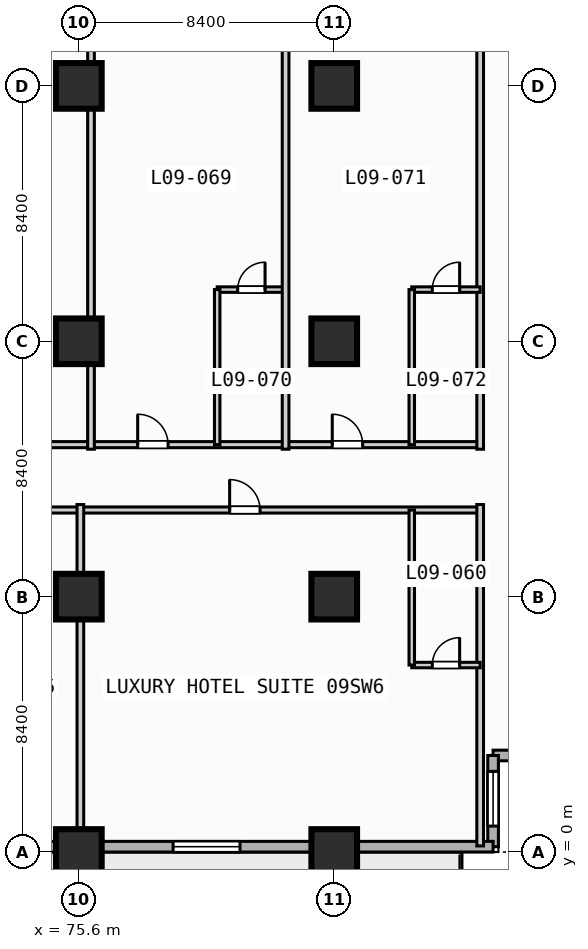
"""IFC4 building model, lengths in metres.
Left out: names, types, materials, properties, quantities, classifications, styles, units other than length and angle.
Written with IfcOpenShell. Run it as: python <this file> out.ifc"""

import sys

from ifc_helpers import new_model, si_unit, direction, frame, frame_2d, origin, origin_2d, place, context, subcontext, project, spatial, rectangle, extrude, element, fill, save


model = new_model("IFC4")
c1 = context("Model", 3, precision=1e-05, world=origin(), true_north=direction((0.0, 1.0)))
c2 = subcontext(c1, "Body", "Model", "MODEL_VIEW")
j1 = project(units=[si_unit("LENGTHUNIT", "METRE"), si_unit("PLANEANGLEUNIT", "RADIAN")], contexts=[c1])
p1 = place(None, origin())
s1 = spatial("IfcSite", under=j1, at=p1, CompositionType="ELEMENT")
p2 = place(p1, origin())
s2 = spatial("IfcBuilding", under=s1, at=p2, CompositionType="ELEMENT")
p3 = place(p2, frame((0.0, 0.0, 43.4)))
s3 = spatial("IfcBuildingStorey", under=s2, at=p3, CompositionType="ELEMENT", Elevation=43.4)
for number, where, z_axis, x_axis in (
    (1, (75.6, 0.0, 0.0), (0.0, 0.0, 1.0), (1.0, 0.0, 0.0)),
    (2, (75.6, 8.4, 0.0), (0.0, 0.0, 1.0), (1.0, 0.0, 0.0)),
    (3, (75.6, 16.8, 0.0), (0.0, 0.0, 1.0), (1.0, 0.0, 0.0)),
    (4, (75.6, 25.2, 0.0), (0.0, 0.0, 1.0), (1.0, 0.0, 0.0)),
    (5, (84.0, 0.0, 0.0), (0.0, 0.0, 1.0), (1.0, 0.0, 0.0)),
    (6, (84.0, 8.4, 0.0), (0.0, 0.0, 1.0), (1.0, 0.0, 0.0)),
    (7, (84.0, 16.8, 0.0), (0.0, 0.0, 1.0), (1.0, 0.0, 0.0)),
    (8, (84.0, 25.2, 0.0), (0.0, 0.0, 1.0), (1.0, 0.0, 0.0)),
):
    element("IfcColumn", number, at=place(p3, frame(where, z_axis=z_axis, x_axis=x_axis)), inside=s3, PredefinedType="COLUMN", context=c2, shape_type="SweptSolid", body=[
        extrude(rectangle(XDim=1.5, YDim=1.5, at=origin_2d()), origin(), (0.0, 0.0, 1.0), 3.8),
    ])
p4 = place(p3, frame((92.225, 3.175, 0.0), z_axis=(0.0, 0.0, 1.0), x_axis=(-1.0, 0.0, 0.0)))
e9 = element("IfcWall", 9, at=p4, inside=s3, PredefinedType="STANDARD", context=c2, shape_type="SweptSolid", body=[
    extrude(rectangle(XDim=3.0, YDim=0.35, at=frame_2d((1.5, 0.0))), origin(), (0.0, 0.0, 1.0), 3.55),
])
p5 = place(p3, frame((89.225, 3.175, 0.0), z_axis=(0.0, 0.0, 1.0), x_axis=(0.0, -1.0, 0.0)))
e10 = element("IfcWall", 10, at=p5, inside=s3, PredefinedType="STANDARD", context=c2, shape_type="SweptSolid", body=[
    extrude(rectangle(XDim=3.0, YDim=0.35, at=frame_2d((1.5, 0.0))), origin(), (0.0, 0.0, 1.0), 3.55),
])
p6 = place(p5, frame((0.522, 0.0, 0.85)))
e11 = element("IfcOpeningElement", 11, at=p6, cuts=e10, PredefinedType="OPENING", context=c2, shape_type="SweptSolid", body=[
    extrude(rectangle(XDim=1.8, YDim=1.8, at=frame_2d((0.9, 0.9))), frame((0.0, 0.185, 0.0), z_axis=(0.0, -1.0, 0.0), x_axis=(1.0, 0.0, 0.0)), (0.0, 0.0, 1.0), 0.37),
])
p7 = place(p3, frame((89.225, 0.175, 0.0), z_axis=(0.0, 0.0, 1.0), x_axis=(-1.0, 0.0, 0.0)))
e12 = element("IfcWall", 12, at=p7, inside=s3, PredefinedType="STANDARD", context=c2, shape_type="SweptSolid", body=[
    extrude(rectangle(XDim=86.05, YDim=0.35, at=frame_2d((43.025, 0.0))), origin(), (0.0, 0.0, 1.0), 3.55),
])
p8 = place(p7, frame((67.525, 0.0, 0.0)))
e13 = element("IfcOpeningElement", 13, at=p8, cuts=e12, PredefinedType="OPENING", context=c2, shape_type="SweptSolid", body=[
    extrude(rectangle(XDim=1.4, YDim=2.2, at=frame_2d((0.7, 1.1))), frame((0.0, 0.185, 0.0), z_axis=(0.0, -1.0, 0.0), x_axis=(1.0, 0.0, 0.0)), (0.0, 0.0, 1.0), 0.37),
])
p9 = place(p7, frame((58.725, 0.0, 0.85)))
e14 = element("IfcOpeningElement", 14, at=p9, cuts=e12, PredefinedType="OPENING", context=c2, shape_type="SweptSolid", body=[
    extrude(rectangle(XDim=2.2, YDim=1.8, at=frame_2d((1.1, 0.9))), frame((0.0, 0.185, 0.0), z_axis=(0.0, -1.0, 0.0), x_axis=(1.0, 0.0, 0.0)), (0.0, 0.0, 1.0), 0.37),
])
p10 = place(p7, frame((41.925, 0.0, 0.85)))
e15 = element("IfcOpeningElement", 15, at=p10, cuts=e12, PredefinedType="OPENING", context=c2, shape_type="SweptSolid", body=[
    extrude(rectangle(XDim=2.2, YDim=1.8, at=frame_2d((1.1, 0.9))), frame((0.0, 0.185, 0.0), z_axis=(0.0, -1.0, 0.0), x_axis=(1.0, 0.0, 0.0)), (0.0, 0.0, 1.0), 0.37),
])
p11 = place(p7, frame((33.525, 0.0, 0.85)))
e16 = element("IfcOpeningElement", 16, at=p11, cuts=e12, PredefinedType="OPENING", context=c2, shape_type="SweptSolid", body=[
    extrude(rectangle(XDim=2.2, YDim=1.8, at=frame_2d((1.1, 0.9))), frame((0.0, 0.185, 0.0), z_axis=(0.0, -1.0, 0.0), x_axis=(1.0, 0.0, 0.0)), (0.0, 0.0, 1.0), 0.37),
])
p12 = place(p7, frame((16.725, 0.0, 0.85)))
e17 = element("IfcOpeningElement", 17, at=p12, cuts=e12, PredefinedType="OPENING", context=c2, shape_type="SweptSolid", body=[
    extrude(rectangle(XDim=2.2, YDim=1.8, at=frame_2d((1.1, 0.9))), frame((0.0, 0.185, 0.0), z_axis=(0.0, -1.0, 0.0), x_axis=(1.0, 0.0, 0.0)), (0.0, 0.0, 1.0), 0.37),
])
p13 = place(p7, frame((8.325, 0.0, 0.85)))
e18 = element("IfcOpeningElement", 18, at=p13, cuts=e12, PredefinedType="OPENING", context=c2, shape_type="SweptSolid", body=[
    extrude(rectangle(XDim=2.2, YDim=1.8, at=frame_2d((1.1, 0.9))), frame((0.0, 0.185, 0.0), z_axis=(0.0, -1.0, 0.0), x_axis=(1.0, 0.0, 0.0)), (0.0, 0.0, 1.0), 0.37),
])
p14 = place(p3, frame((13.65, 11.25, 0.0), z_axis=(0.0, 0.0, 1.0), x_axis=(1.0, 0.0, 0.0)))
e19 = element("IfcWall", 19, at=p14, inside=s3, PredefinedType="PARTITIONING", context=c2, shape_type="SweptSolid", body=[
    extrude(rectangle(XDim=75.15, YDim=0.2, at=frame_2d((37.575, 0.0))), origin(), (0.0, 0.0, 1.0), 3.55),
])
p15 = place(p14, frame((7.265, 0.0, 0.0)))
e20 = element("IfcOpeningElement", 20, at=p15, cuts=e19, PredefinedType="OPENING", context=c2, shape_type="SweptSolid", body=[
    extrude(rectangle(XDim=1.0, YDim=2.15, at=frame_2d((0.5, 1.075))), frame((0.0, 0.11, 0.0), z_axis=(0.0, -1.0, 0.0), x_axis=(1.0, 0.0, 0.0)), (0.0, 0.0, 1.0), 0.22),
])
p16 = place(p14, frame((17.135, 0.0, 0.0)))
e21 = element("IfcOpeningElement", 21, at=p16, cuts=e19, PredefinedType="OPENING", context=c2, shape_type="SweptSolid", body=[
    extrude(rectangle(XDim=1.0, YDim=2.15, at=frame_2d((0.5, 1.075))), frame((0.0, 0.11, 0.0), z_axis=(0.0, -1.0, 0.0), x_axis=(1.0, 0.0, 0.0)), (0.0, 0.0, 1.0), 0.22),
])
p17 = place(p14, frame((31.665, 0.0, 0.0)))
e22 = element("IfcOpeningElement", 22, at=p17, cuts=e19, PredefinedType="OPENING", context=c2, shape_type="SweptSolid", body=[
    extrude(rectangle(XDim=1.0, YDim=2.15, at=frame_2d((0.5, 1.075))), frame((0.0, 0.11, 0.0), z_axis=(0.0, -1.0, 0.0), x_axis=(1.0, 0.0, 0.0)), (0.0, 0.0, 1.0), 0.22),
])
p18 = place(p14, frame((41.535, 0.0, 0.0)))
e23 = element("IfcOpeningElement", 23, at=p18, cuts=e19, PredefinedType="OPENING", context=c2, shape_type="SweptSolid", body=[
    extrude(rectangle(XDim=1.0, YDim=2.15, at=frame_2d((0.5, 1.075))), frame((0.0, 0.11, 0.0), z_axis=(0.0, -1.0, 0.0), x_axis=(1.0, 0.0, 0.0)), (0.0, 0.0, 1.0), 0.22),
])
p19 = place(p14, frame((56.065, 0.0, 0.0)))
e24 = element("IfcOpeningElement", 24, at=p19, cuts=e19, PredefinedType="OPENING", context=c2, shape_type="SweptSolid", body=[
    extrude(rectangle(XDim=1.0, YDim=2.15, at=frame_2d((0.5, 1.075))), frame((0.0, 0.11, 0.0), z_axis=(0.0, -1.0, 0.0), x_axis=(1.0, 0.0, 0.0)), (0.0, 0.0, 1.0), 0.22),
])
p20 = place(p14, frame((66.91, 0.0, 0.0)))
e25 = element("IfcOpeningElement", 25, at=p20, cuts=e19, PredefinedType="OPENING", context=c2, shape_type="SweptSolid", body=[
    extrude(rectangle(XDim=1.0, YDim=2.15, at=frame_2d((0.5, 1.075))), frame((0.0, 0.11, 0.0), z_axis=(0.0, -1.0, 0.0), x_axis=(1.0, 0.0, 0.0)), (0.0, 0.0, 1.0), 0.22),
])
p21 = place(p3, frame((75.65, 0.2, 0.0), z_axis=(0.0, 0.0, 1.0), x_axis=(0.0, 1.0, 0.0)))
e26 = element("IfcWall", 26, at=p21, inside=s3, PredefinedType="PARTITIONING", context=c2, shape_type="SweptSolid", body=[
    extrude(rectangle(XDim=11.23, YDim=0.22, at=frame_2d((5.615, 0.0))), origin(), (0.0, 0.0, 1.0), 2.8),
])
p22 = place(p3, frame((88.8, 0.2, 0.0), z_axis=(0.0, 0.0, 1.0), x_axis=(0.0, 1.0, 0.0)))
e27 = element("IfcWall", 27, at=p22, inside=s3, PredefinedType="PARTITIONING", context=c2, shape_type="SweptSolid", body=[
    extrude(rectangle(XDim=11.23, YDim=0.22, at=frame_2d((5.615, 0.0))), origin(), (0.0, 0.0, 1.0), 3.55),
])
p23 = place(p3, frame((86.55, 6.15, 0.0), z_axis=(0.0, 0.0, 1.0), x_axis=(1.0, 0.0, 0.0)))
e28 = element("IfcWall", 28, at=p23, inside=s3, PredefinedType="PLUMBINGWALL", context=c2, shape_type="SweptSolid", body=[
    extrude(rectangle(XDim=2.25, YDim=0.18, at=frame_2d((1.125, 0.0))), origin(), (0.0, 0.0, 1.0), 3.55),
])
p24 = place(p23, frame((0.675, 0.0, 0.0)))
e29 = element("IfcOpeningElement", 29, at=p24, cuts=e28, PredefinedType="OPENING", context=c2, shape_type="SweptSolid", body=[
    extrude(rectangle(XDim=0.9, YDim=2.1, at=frame_2d((0.45, 1.05))), frame((0.0, 0.1, 0.0), z_axis=(0.0, -1.0, 0.0), x_axis=(1.0, 0.0, 0.0)), (0.0, 0.0, 1.0), 0.2),
])
p25 = place(p3, frame((86.55, 6.15, 0.0), z_axis=(0.0, 0.0, 1.0), x_axis=(0.0, 1.0, 0.0)))
e30 = element("IfcWall", 30, at=p25, inside=s3, PredefinedType="PLUMBINGWALL", context=c2, shape_type="SweptSolid", body=[
    extrude(rectangle(XDim=5.1, YDim=0.18, at=frame_2d((2.55, 0.0))), origin(), (0.0, 0.0, 1.0), 3.55),
])
p26 = place(p3, frame((61.6, 13.4, 0.0), z_axis=(0.0, 0.0, 1.0), x_axis=(1.0, 0.0, 0.0)))
e31 = element("IfcWall", 31, at=p26, inside=s3, PredefinedType="PARTITIONING", context=c2, shape_type="SweptSolid", body=[
    extrude(rectangle(XDim=27.2, YDim=0.2, at=frame_2d((13.6, 0.0))), origin(), (0.0, 0.0, 1.0), 3.55),
])
p27 = place(p26, frame((4.265, 0.0, 0.0)))
e32 = element("IfcOpeningElement", 32, at=p27, cuts=e31, PredefinedType="OPENING", context=c2, shape_type="SweptSolid", body=[
    extrude(rectangle(XDim=1.0, YDim=2.15, at=frame_2d((0.5, 1.075))), frame((0.0, 0.11, 0.0), z_axis=(0.0, -1.0, 0.0), x_axis=(1.0, 0.0, 0.0)), (0.0, 0.0, 1.0), 0.22),
])
p28 = place(p26, frame((11.465, 0.0, 0.0)))
e33 = element("IfcOpeningElement", 33, at=p28, cuts=e31, PredefinedType="OPENING", context=c2, shape_type="SweptSolid", body=[
    extrude(rectangle(XDim=1.0, YDim=2.15, at=frame_2d((0.5, 1.075))), frame((0.0, 0.11, 0.0), z_axis=(0.0, -1.0, 0.0), x_axis=(1.0, 0.0, 0.0)), (0.0, 0.0, 1.0), 0.22),
])
p29 = place(p26, frame((15.935, 0.0, 0.0)))
e34 = element("IfcOpeningElement", 34, at=p29, cuts=e31, PredefinedType="OPENING", context=c2, shape_type="SweptSolid", body=[
    extrude(rectangle(XDim=1.0, YDim=2.15, at=frame_2d((0.5, 1.075))), frame((0.0, 0.11, 0.0), z_axis=(0.0, -1.0, 0.0), x_axis=(1.0, 0.0, 0.0)), (0.0, 0.0, 1.0), 0.22),
])
p30 = place(p26, frame((22.335, 0.0, 0.0)))
e35 = element("IfcOpeningElement", 35, at=p30, cuts=e31, PredefinedType="OPENING", context=c2, shape_type="SweptSolid", body=[
    extrude(rectangle(XDim=1.0, YDim=2.15, at=frame_2d((0.5, 1.075))), frame((0.0, 0.11, 0.0), z_axis=(0.0, -1.0, 0.0), x_axis=(1.0, 0.0, 0.0)), (0.0, 0.0, 1.0), 0.22),
])
p31 = place(p3, frame((76.0, 13.25, 0.0), z_axis=(0.0, 0.0, 1.0), x_axis=(0.0, 1.0, 0.0)))
e36 = element("IfcWall", 36, at=p31, inside=s3, PredefinedType="PARTITIONING", context=c2, shape_type="SweptSolid", body=[
    extrude(rectangle(XDim=20.18, YDim=0.22, at=frame_2d((10.09, 0.0))), origin(), (0.0, 0.0, 1.0), 3.55),
])
p32 = place(p3, frame((80.15, 18.5, 0.0), z_axis=(0.0, 0.0, 1.0), x_axis=(1.0, 0.0, 0.0)))
e37 = element("IfcWall", 37, at=p32, inside=s3, PredefinedType="PLUMBINGWALL", context=c2, shape_type="SweptSolid", body=[
    extrude(rectangle(XDim=2.25, YDim=0.18, at=frame_2d((1.125, 0.0))), origin(), (0.0, 0.0, 1.0), 3.55),
])
p33 = place(p32, frame((0.675, 0.0, 0.0)))
e38 = element("IfcOpeningElement", 38, at=p33, cuts=e37, PredefinedType="OPENING", context=c2, shape_type="SweptSolid", body=[
    extrude(rectangle(XDim=0.9, YDim=2.1, at=frame_2d((0.45, 1.05))), frame((0.0, 0.1, 0.0), z_axis=(0.0, -1.0, 0.0), x_axis=(1.0, 0.0, 0.0)), (0.0, 0.0, 1.0), 0.2),
])
p34 = place(p3, frame((80.15, 13.4, 0.0), z_axis=(0.0, 0.0, 1.0), x_axis=(0.0, 1.0, 0.0)))
e39 = element("IfcWall", 39, at=p34, inside=s3, PredefinedType="PLUMBINGWALL", context=c2, shape_type="SweptSolid", body=[
    extrude(rectangle(XDim=5.1, YDim=0.18, at=frame_2d((2.55, 0.0))), origin(), (0.0, 0.0, 1.0), 3.55),
])
for number, where, z_axis, x_axis in (
    (40, (82.4, 13.25, 0.0), (0.0, 0.0, 1.0), (0.0, 1.0, 0.0)),
    (41, (88.8, 13.25, 0.0), (0.0, 0.0, 1.0), (0.0, 1.0, 0.0)),
):
    element("IfcWall", number, at=place(p3, frame(where, z_axis=z_axis, x_axis=x_axis)), inside=s3, PredefinedType="PARTITIONING", context=c2, shape_type="SweptSolid", body=[
        extrude(rectangle(XDim=20.18, YDim=0.22, at=frame_2d((10.09, 0.0))), origin(), (0.0, 0.0, 1.0), 3.55),
    ])
p35 = place(p3, frame((86.55, 18.5, 0.0), z_axis=(0.0, 0.0, 1.0), x_axis=(1.0, 0.0, 0.0)))
e42 = element("IfcWall", 42, at=p35, inside=s3, PredefinedType="PLUMBINGWALL", context=c2, shape_type="SweptSolid", body=[
    extrude(rectangle(XDim=2.25, YDim=0.18, at=frame_2d((1.125, 0.0))), origin(), (0.0, 0.0, 1.0), 3.55),
])
p36 = place(p35, frame((0.675, 0.0, 0.0)))
e43 = element("IfcOpeningElement", 43, at=p36, cuts=e42, PredefinedType="OPENING", context=c2, shape_type="SweptSolid", body=[
    extrude(rectangle(XDim=0.9, YDim=2.1, at=frame_2d((0.45, 1.05))), frame((0.0, 0.1, 0.0), z_axis=(0.0, -1.0, 0.0), x_axis=(1.0, 0.0, 0.0)), (0.0, 0.0, 1.0), 0.2),
])
p37 = place(p3, frame((86.55, 13.4, 0.0), z_axis=(0.0, 0.0, 1.0), x_axis=(0.0, 1.0, 0.0)))
e44 = element("IfcWall", 44, at=p37, inside=s3, PredefinedType="PLUMBINGWALL", context=c2, shape_type="SweptSolid", body=[
    extrude(rectangle(XDim=5.1, YDim=0.18, at=frame_2d((2.55, 0.0))), origin(), (0.0, 0.0, 1.0), 3.55),
])
p38 = place(p6, origin())
e45 = element("IfcWindow", 45, at=p38, inside=s3, PartitioningType="SINGLE_PANEL", PredefinedType="WINDOW", context=c2, shape_type="SweptSolid", body=[
    extrude(rectangle(XDim=1.8, YDim=1.8, at=frame_2d((0.9, 0.9))), frame((0.0, 0.03, 0.0), z_axis=(0.0, -1.0, 0.0), x_axis=(1.0, 0.0, 0.0)), (0.0, 0.0, 1.0), 0.06),
])
fill(e11, e45)
p39 = place(p13, origin())
e46 = element("IfcWindow", 46, at=p39, inside=s3, PartitioningType="SINGLE_PANEL", PredefinedType="WINDOW", context=c2, shape_type="SweptSolid", body=[
    extrude(rectangle(XDim=2.2, YDim=1.8, at=frame_2d((1.1, 0.9))), frame((0.0, 0.03, 0.0), z_axis=(0.0, -1.0, 0.0), x_axis=(1.0, 0.0, 0.0)), (0.0, 0.0, 1.0), 0.06),
])
fill(e18, e46)
p40 = place(p20, origin())
e47 = element("IfcDoor", 47, at=p40, inside=s3, OperationType="SINGLE_SWING_LEFT", PredefinedType="DOOR", context=c2, shape_type="SweptSolid", body=[
    extrude(rectangle(XDim=1.0, YDim=2.15, at=frame_2d((0.5, 1.075))), frame((0.0, 0.025, 0.0), z_axis=(0.0, -1.0, 0.0), x_axis=(1.0, 0.0, 0.0)), (0.0, 0.0, 1.0), 0.05),
])
fill(e25, e47)
p41 = place(p24, origin())
e48 = element("IfcDoor", 48, at=p41, inside=s3, OperationType="SINGLE_SWING_RIGHT", PredefinedType="DOOR", context=c2, shape_type="SweptSolid", body=[
    extrude(rectangle(XDim=0.9, YDim=2.1, at=frame_2d((0.45, 1.05))), frame((0.0, 0.025, 0.0), z_axis=(0.0, -1.0, 0.0), x_axis=(1.0, 0.0, 0.0)), (0.0, 0.0, 1.0), 0.05),
])
fill(e29, e48)
p42 = place(p29, origin())
e49 = element("IfcDoor", 49, at=p42, inside=s3, OperationType="SINGLE_SWING_LEFT", PredefinedType="DOOR", context=c2, shape_type="SweptSolid", body=[
    extrude(rectangle(XDim=1.0, YDim=2.15, at=frame_2d((0.5, 1.075))), frame((0.0, 0.025, 0.0), z_axis=(0.0, -1.0, 0.0), x_axis=(1.0, 0.0, 0.0)), (0.0, 0.0, 1.0), 0.05),
])
fill(e34, e49)
p43 = place(p30, origin())
e50 = element("IfcDoor", 50, at=p43, inside=s3, OperationType="SINGLE_SWING_LEFT", PredefinedType="DOOR", context=c2, shape_type="SweptSolid", body=[
    extrude(rectangle(XDim=1.0, YDim=2.15, at=frame_2d((0.5, 1.075))), frame((0.0, 0.025, 0.0), z_axis=(0.0, -1.0, 0.0), x_axis=(1.0, 0.0, 0.0)), (0.0, 0.0, 1.0), 0.05),
])
fill(e35, e50)
p44 = place(p33, origin())
e51 = element("IfcDoor", 51, at=p44, inside=s3, OperationType="SINGLE_SWING_RIGHT", PredefinedType="DOOR", context=c2, shape_type="SweptSolid", body=[
    extrude(rectangle(XDim=0.9, YDim=2.1, at=frame_2d((0.45, 1.05))), frame((0.0, 0.025, 0.0), z_axis=(0.0, -1.0, 0.0), x_axis=(1.0, 0.0, 0.0)), (0.0, 0.0, 1.0), 0.05),
])
fill(e38, e51)
p45 = place(p36, origin())
e52 = element("IfcDoor", 52, at=p45, inside=s3, OperationType="SINGLE_SWING_RIGHT", PredefinedType="DOOR", context=c2, shape_type="SweptSolid", body=[
    extrude(rectangle(XDim=0.9, YDim=2.1, at=frame_2d((0.45, 1.05))), frame((0.0, 0.025, 0.0), z_axis=(0.0, -1.0, 0.0), x_axis=(1.0, 0.0, 0.0)), (0.0, 0.0, 1.0), 0.05),
])
fill(e43, e52)
save(model, sys.argv[1])
